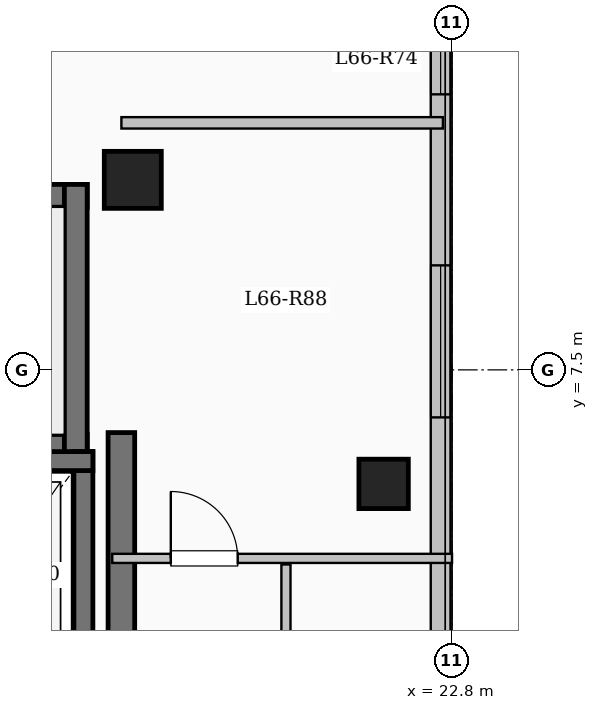
"""IFC4 building model, lengths in metres.
Left out: names, types, materials, properties, quantities, classifications, styles, units other than length and angle.
Written with IfcOpenShell. Run it as: python <this file> out.ifc"""

import sys

from ifc_helpers import new_model, si_unit, direction, frame, frame_2d, origin, origin_2d, place, context, subcontext, project, spatial, rectangle, extrude, element, fill, save


model = new_model("IFC4")
c1 = context("Model", 3, precision=1e-05, world=origin(), true_north=direction((0.0, 1.0)))
c2 = subcontext(c1, "Body", "Model", "MODEL_VIEW")
j1 = project(units=[si_unit("LENGTHUNIT", "METRE"), si_unit("PLANEANGLEUNIT", "RADIAN")], contexts=[c1])
p1 = place(None, origin())
s1 = spatial("IfcSite", under=j1, at=p1, CompositionType="ELEMENT")
p2 = place(p1, origin())
s2 = spatial("IfcBuilding", under=s1, at=p2, CompositionType="ELEMENT")
p3 = place(p2, frame((0.0, 0.0, 244.85)))
s3 = spatial("IfcBuildingStorey", under=s2, at=p3, CompositionType="ELEMENT", Elevation=244.85)
p4 = place(p3, frame((18.6, 10.0, 0.0), z_axis=(0.0, 0.0, 1.0), x_axis=(1.0, 0.0, 0.0)))
e1 = element("IfcColumn", 1, at=p4, inside=s3, PredefinedType="COLUMN", context=c2, shape_type="SweptSolid", body=[
    extrude(rectangle(XDim=0.75, YDim=0.75, at=origin_2d()), origin(), (0.0, 0.0, 1.0), 3.35),
])
p5 = place(p3, frame((21.9, 6.0, 0.0), z_axis=(0.0, 0.0, 1.0), x_axis=(1.0, 0.0, 0.0)))
e2 = element("IfcColumn", 2, at=p5, inside=s3, PredefinedType="COLUMN", context=c2, shape_type="SweptSolid", body=[
    extrude(rectangle(XDim=0.65, YDim=0.65, at=origin_2d()), origin(), (0.0, 0.0, 1.0), 3.35),
])
p6 = place(p3, frame((22.65, 17.55, 0.0), z_axis=(0.0, 0.0, 1.0), x_axis=(0.0, -1.0, 0.0)))
e3 = element("IfcWall", 3, at=p6, inside=s3, PredefinedType="SOLIDWALL", context=c2, shape_type="SweptSolid", body=[
    extrude(rectangle(XDim=35.1, YDim=0.26, at=frame_2d((17.55, 0.0))), origin(), (0.0, 0.0, 1.0), 3.1),
])
p7 = place(p6, frame((1.525, 0.0, 0.9)))
e4 = element("IfcOpeningElement", 4, at=p7, cuts=e3, PredefinedType="OPENING", context=c2, shape_type="SweptSolid", body=[
    extrude(rectangle(XDim=2.0, YDim=1.7, at=frame_2d((1.0, 0.85))), frame((0.0, 0.14, 0.0), z_axis=(0.0, -1.0, 0.0), x_axis=(1.0, 0.0, 0.0)), (0.0, 0.0, 1.0), 0.28),
])
p8 = place(p6, frame((5.425, 0.0, 0.95)))
e5 = element("IfcOpeningElement", 5, at=p8, cuts=e3, PredefinedType="OPENING", context=c2, shape_type="SweptSolid", body=[
    extrude(rectangle(XDim=1.0, YDim=1.5, at=frame_2d((0.5, 0.75))), frame((0.0, 0.14, 0.0), z_axis=(0.0, -1.0, 0.0), x_axis=(1.0, 0.0, 0.0)), (0.0, 0.0, 1.0), 0.28),
])
p9 = place(p6, frame((8.675, 0.0, 0.9)))
e6 = element("IfcOpeningElement", 6, at=p9, cuts=e3, PredefinedType="OPENING", context=c2, shape_type="SweptSolid", body=[
    extrude(rectangle(XDim=2.0, YDim=1.7, at=frame_2d((1.0, 0.85))), frame((0.0, 0.14, 0.0), z_axis=(0.0, -1.0, 0.0), x_axis=(1.0, 0.0, 0.0)), (0.0, 0.0, 1.0), 0.28),
])
p10 = place(p6, frame((13.5, 0.0, 0.9)))
e7 = element("IfcOpeningElement", 7, at=p10, cuts=e3, PredefinedType="OPENING", context=c2, shape_type="SweptSolid", body=[
    extrude(rectangle(XDim=1.65, YDim=1.6, at=frame_2d((0.825, 0.8))), frame((0.0, 0.14, 0.0), z_axis=(0.0, -1.0, 0.0), x_axis=(1.0, 0.0, 0.0)), (0.0, 0.0, 1.0), 0.28),
])
p11 = place(p6, frame((19.35, 0.0, 0.9)))
e8 = element("IfcOpeningElement", 8, at=p11, cuts=e3, PredefinedType="OPENING", context=c2, shape_type="SweptSolid", body=[
    extrude(rectangle(XDim=2.2, YDim=1.75, at=frame_2d((1.1, 0.875))), frame((0.0, 0.14, 0.0), z_axis=(0.0, -1.0, 0.0), x_axis=(1.0, 0.0, 0.0)), (0.0, 0.0, 1.0), 0.28),
])
p12 = place(p6, frame((25.275, 0.0, 0.95)))
e9 = element("IfcOpeningElement", 9, at=p12, cuts=e3, PredefinedType="OPENING", context=c2, shape_type="SweptSolid", body=[
    extrude(rectangle(XDim=1.2, YDim=1.5, at=frame_2d((0.6, 0.75))), frame((0.0, 0.14, 0.0), z_axis=(0.0, -1.0, 0.0), x_axis=(1.0, 0.0, 0.0)), (0.0, 0.0, 1.0), 0.28),
])
p13 = place(p6, frame((29.925, 0.0, 0.9)))
e10 = element("IfcOpeningElement", 10, at=p13, cuts=e3, PredefinedType="OPENING", context=c2, shape_type="SweptSolid", body=[
    extrude(rectangle(XDim=2.2, YDim=1.75, at=frame_2d((1.1, 0.875))), frame((0.0, 0.14, 0.0), z_axis=(0.0, -1.0, 0.0), x_axis=(1.0, 0.0, 0.0)), (0.0, 0.0, 1.0), 0.28),
])
p14 = place(p3, frame((10.0, 9.79, 0.0), z_axis=(0.0, 0.0, 1.0), x_axis=(1.0, 0.0, 0.0)))
e11 = element("IfcWall", 11, at=p14, inside=s3, PredefinedType="SHEAR", context=c2, shape_type="SweptSolid", body=[
    extrude(rectangle(XDim=8.0, YDim=0.3, at=frame_2d((4.0, 0.0))), origin(), (0.0, 0.0, 1.0), 3.35),
])
p15 = place(p3, frame((10.0, 6.5, 0.0), z_axis=(0.0, 0.0, 1.0), x_axis=(1.0, 0.0, 0.0)))
e12 = element("IfcWall", 12, at=p15, inside=s3, PredefinedType="SHEAR", context=c2, shape_type="SweptSolid", body=[
    extrude(rectangle(XDim=8.0, YDim=0.3, at=frame_2d((4.0, 0.0))), origin(), (0.0, 0.0, 1.0), 3.35),
])
p16 = place(p15, frame((0.55, 0.0, 0.0)))
e13 = element("IfcOpeningElement", 13, at=p16, cuts=e12, PredefinedType="OPENING", context=c2, shape_type="SweptSolid", body=[
    extrude(rectangle(XDim=1.0, YDim=2.15, at=frame_2d((0.5, 1.075))), frame((0.0, 0.16, 0.0), z_axis=(0.0, -1.0, 0.0), x_axis=(1.0, 0.0, 0.0)), (0.0, 0.0, 1.0), 0.32),
])
p17 = place(p3, frame((17.85, 6.35, 0.0), z_axis=(0.0, 0.0, 1.0), x_axis=(0.0, 1.0, 0.0)))
e14 = element("IfcWall", 14, at=p17, inside=s3, PredefinedType="SHEAR", context=c2, shape_type="SweptSolid", body=[
    extrude(rectangle(XDim=3.59, YDim=0.3, at=frame_2d((1.795, 0.0))), origin(), (0.0, 0.0, 1.0), 3.35),
])
p18 = place(p3, frame((17.95, 3.175, 0.0), z_axis=(0.0, 0.0, 1.0), x_axis=(0.0, 1.0, 0.0)))
e15 = element("IfcWall", 15, at=p18, inside=s3, PredefinedType="SHEAR", context=c2, shape_type="SweptSolid", body=[
    extrude(rectangle(XDim=3.25, YDim=0.25, at=frame_2d((1.625, 0.0))), origin(), (0.0, 0.0, 1.0), 3.35),
])
p19 = place(p3, frame((15.525, 6.3, 0.0), z_axis=(0.0, 0.0, 1.0), x_axis=(1.0, 0.0, 0.0)))
e16 = element("IfcWall", 16, at=p19, inside=s3, PredefinedType="SHEAR", context=c2, shape_type="SweptSolid", body=[
    extrude(rectangle(XDim=2.55, YDim=0.25, at=frame_2d((1.275, 0.0))), origin(), (0.0, 0.0, 1.0), 3.35),
])
p20 = place(p3, frame((18.45, -7.375, 0.0), z_axis=(0.0, 0.0, 1.0), x_axis=(0.0, 1.0, 0.0)))
e17 = element("IfcWall", 17, at=p20, inside=s3, PredefinedType="SHEAR", context=c2, shape_type="SweptSolid", body=[
    extrude(rectangle(XDim=14.05, YDim=0.35, at=frame_2d((7.025, 0.0))), origin(), (0.0, 0.0, 1.0), 3.35),
])
p21 = place(p3, frame((18.45, 10.75, 0.0), z_axis=(0.0, 0.0, 1.0), x_axis=(1.0, 0.0, 0.0)))
e18 = element("IfcWall", 18, at=p21, inside=s3, PredefinedType="PARTITIONING", context=c2, shape_type="SweptSolid", body=[
    extrude(rectangle(XDim=4.23, YDim=0.15, at=frame_2d((2.115, 0.0))), origin(), (0.0, 0.0, 1.0), 3.1),
])
p22 = place(p3, frame((18.33, 5.02, 0.0), z_axis=(0.0, 0.0, 1.0), x_axis=(1.0, 0.0, 0.0)))
e19 = element("IfcWall", 19, at=p22, inside=s3, PredefinedType="PARTITIONING", context=c2, shape_type="SweptSolid", body=[
    extrude(rectangle(XDim=4.47, YDim=0.12, at=frame_2d((2.235, 0.0))), origin(), (0.0, 0.0, 1.0), 3.1),
])
p23 = place(p22, frame((0.77, 0.0, 0.0)))
e20 = element("IfcOpeningElement", 20, at=p23, cuts=e19, PredefinedType="OPENING", context=c2, shape_type="SweptSolid", body=[
    extrude(rectangle(XDim=0.88, YDim=2.1, at=frame_2d((0.44, 1.05))), frame((0.0, 0.07, 0.0), z_axis=(0.0, -1.0, 0.0), x_axis=(1.0, 0.0, 0.0)), (0.0, 0.0, 1.0), 0.14),
])
p24 = place(p3, frame((20.615, 1.36, 0.0), z_axis=(0.0, 0.0, 1.0), x_axis=(0.0, 1.0, 0.0)))
e21 = element("IfcWall", 21, at=p24, inside=s3, PredefinedType="PARTITIONING", context=c2, shape_type="SweptSolid", body=[
    extrude(rectangle(XDim=3.58, YDim=0.12, at=frame_2d((1.79, 0.0))), origin(), (0.0, 0.0, 1.0), 3.1),
])
p25 = place(p8, origin())
e22 = element("IfcWindow", 22, at=p25, inside=s3, PartitioningType="SINGLE_PANEL", PredefinedType="WINDOW", context=c2, shape_type="SweptSolid", body=[
    extrude(rectangle(XDim=1.0, YDim=1.5, at=frame_2d((0.5, 0.75))), frame((0.0, 0.03, 0.0), z_axis=(0.0, -1.0, 0.0), x_axis=(1.0, 0.0, 0.0)), (0.0, 0.0, 1.0), 0.06),
])
fill(e5, e22)
p26 = place(p9, origin())
e23 = element("IfcWindow", 23, at=p26, inside=s3, PartitioningType="SINGLE_PANEL", PredefinedType="WINDOW", context=c2, shape_type="SweptSolid", body=[
    extrude(rectangle(XDim=2.0, YDim=1.7, at=frame_2d((1.0, 0.85))), frame((0.0, 0.03, 0.0), z_axis=(0.0, -1.0, 0.0), x_axis=(1.0, 0.0, 0.0)), (0.0, 0.0, 1.0), 0.06),
])
fill(e6, e23)
p27 = place(p23, origin())
e24 = element("IfcDoor", 24, at=p27, inside=s3, OperationType="SINGLE_SWING_LEFT", PredefinedType="DOOR", context=c2, shape_type="SweptSolid", body=[
    extrude(rectangle(XDim=0.88, YDim=2.1, at=frame_2d((0.44, 1.05))), frame((0.0, 0.025, 0.0), z_axis=(0.0, -1.0, 0.0), x_axis=(1.0, 0.0, 0.0)), (0.0, 0.0, 1.0), 0.05),
])
fill(e20, e24)
save(model, sys.argv[1])
